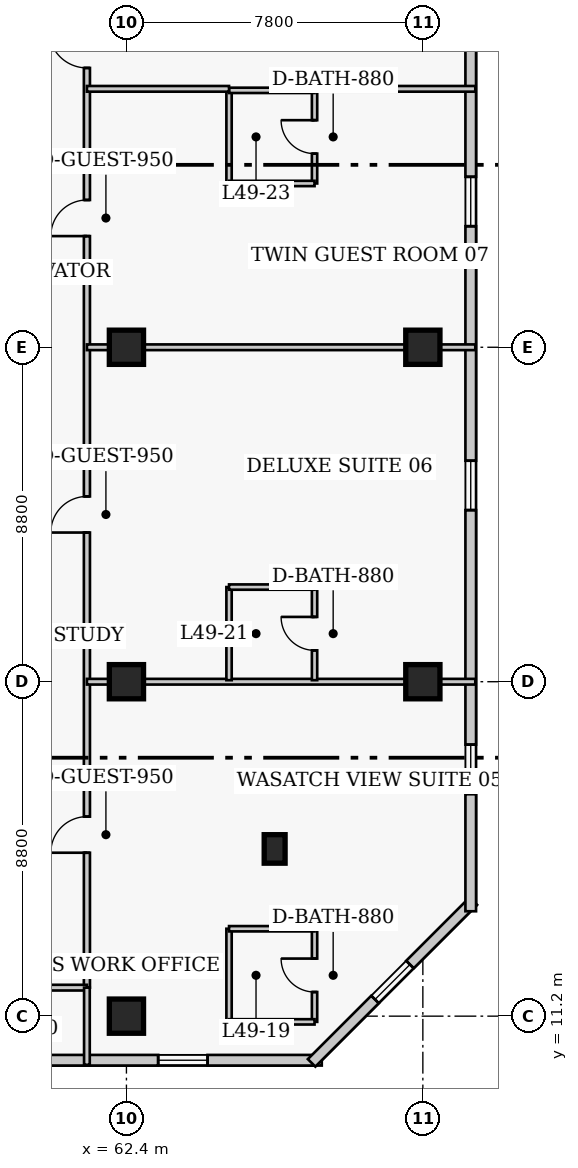
"""IFC4 building model, lengths in metres.
Left out: names, types, materials, properties, quantities, classifications, styles, units other than length and angle.
Written with IfcOpenShell. Run it as: python <this file> out.ifc"""

import sys

from ifc_helpers import new_model, si_unit, direction, frame, frame_2d, origin, origin_2d, place, context, subcontext, project, spatial, rectangle, extrude, element, fill, save


model = new_model("IFC4")
c1 = context("Model", 3, precision=1e-05, world=origin(), true_north=direction((0.0, 1.0)))
c2 = subcontext(c1, "Body", "Model", "MODEL_VIEW")
j1 = project(units=[si_unit("LENGTHUNIT", "METRE"), si_unit("PLANEANGLEUNIT", "RADIAN")], contexts=[c1])
p1 = place(None, origin())
s1 = spatial("IfcSite", under=j1, at=p1, CompositionType="ELEMENT")
p2 = place(p1, origin())
s2 = spatial("IfcBuilding", under=s1, at=p2, CompositionType="ELEMENT")
p3 = place(p2, frame((0.0, 0.0, 196.8)))
s3 = spatial("IfcBuildingStorey", under=s2, at=p3, CompositionType="ELEMENT", Elevation=196.8)
for number, where, z_axis, x_axis in (
    (1, (62.4, 11.2, 0.0), (0.0, 0.0, 1.0), (1.0, 0.0, 0.0)),
    (2, (62.4, 20.0, 0.0), (0.0, 0.0, 1.0), (1.0, 0.0, 0.0)),
    (3, (62.4, 28.8, 0.0), (0.0, 0.0, 1.0), (1.0, 0.0, 0.0)),
    (4, (70.2, 20.0, 0.0), (0.0, 0.0, 1.0), (1.0, 0.0, 0.0)),
    (5, (70.2, 28.8, 0.0), (0.0, 0.0, 1.0), (1.0, 0.0, 0.0)),
):
    element("IfcColumn", number, at=place(p3, frame(where, z_axis=z_axis, x_axis=x_axis)), inside=s3, PredefinedType="COLUMN", context=c2, shape_type="SweptSolid", body=[
        extrude(rectangle(XDim=0.9, YDim=0.9, at=origin_2d()), origin(), (0.0, 0.0, 1.0), 3.9),
    ])
p4 = place(p3, frame((66.3, 15.6, 0.0), z_axis=(0.0, 0.0, 1.0), x_axis=(1.0, 0.0, 0.0)))
e6 = element("IfcColumn", 6, at=p4, inside=s3, PredefinedType="PILASTER", context=c2, shape_type="SweptSolid", body=[
    extrude(rectangle(XDim=0.55, YDim=0.75, at=origin_2d()), origin(), (0.0, 0.0, 1.0), 3.9),
])
p5 = place(p3, frame((41.71, 10.04, 0.0), z_axis=(0.0, 0.0, 1.0), x_axis=(1.0, 0.0, 0.0)))
e7 = element("IfcWall", 7, at=p5, inside=s3, PredefinedType="SOLIDWALL", context=c2, shape_type="SweptSolid", body=[
    extrude(rectangle(XDim=25.83, YDim=0.28, at=frame_2d((12.915, 0.0))), origin(), (0.0, 0.0, 1.0), 3.65),
])
p6 = place(p5, frame((9.04, 0.0, 0.0)))
e8 = element("IfcOpeningElement", 8, at=p6, cuts=e7, PredefinedType="OPENING", context=c2, shape_type="SweptSolid", body=[
    extrude(rectangle(XDim=1.4, YDim=2.15, at=frame_2d((0.7, 1.075))), frame((0.0, 0.15, 0.0), z_axis=(0.0, -1.0, 0.0), x_axis=(1.0, 0.0, 0.0)), (0.0, 0.0, 1.0), 0.3),
])
p7 = place(p5, frame((3.005, 0.0, 0.85)))
e9 = element("IfcOpeningElement", 9, at=p7, cuts=e7, PredefinedType="OPENING", context=c2, shape_type="SweptSolid", body=[
    extrude(rectangle(XDim=1.3, YDim=1.7, at=frame_2d((0.65, 0.85))), frame((0.0, 0.15, 0.0), z_axis=(0.0, -1.0, 0.0), x_axis=(1.0, 0.0, 0.0)), (0.0, 0.0, 1.0), 0.3),
])
p8 = place(p5, frame((13.415, 0.0, 0.85)))
e10 = element("IfcOpeningElement", 10, at=p8, cuts=e7, PredefinedType="OPENING", context=c2, shape_type="SweptSolid", body=[
    extrude(rectangle(XDim=1.3, YDim=1.7, at=frame_2d((0.65, 0.85))), frame((0.0, 0.15, 0.0), z_axis=(0.0, -1.0, 0.0), x_axis=(1.0, 0.0, 0.0)), (0.0, 0.0, 1.0), 0.3),
])
p9 = place(p5, frame((21.525, 0.0, 0.85)))
e11 = element("IfcOpeningElement", 11, at=p9, cuts=e7, PredefinedType="OPENING", context=c2, shape_type="SweptSolid", body=[
    extrude(rectangle(XDim=1.3, YDim=1.7, at=frame_2d((0.65, 0.85))), frame((0.0, 0.15, 0.0), z_axis=(0.0, -1.0, 0.0), x_axis=(1.0, 0.0, 0.0)), (0.0, 0.0, 1.0), 0.3),
])
p10 = place(p3, frame((67.273, 9.971, 0.0), z_axis=(0.0, 0.0, 1.0), x_axis=(0.707106781187, 0.707106781187, 0.0)))
e12 = element("IfcWall", 12, at=p10, inside=s3, PredefinedType="SOLIDWALL", context=c2, shape_type="SweptSolid", body=[
    extrude(rectangle(XDim=6.02, YDim=0.28, at=frame_2d((3.01, 0.0))), origin(), (0.0, 0.0, 1.0), 3.65),
])
p11 = place(p10, frame((2.36, 0.0, 0.85)))
e13 = element("IfcOpeningElement", 13, at=p11, cuts=e12, PredefinedType="OPENING", context=c2, shape_type="SweptSolid", body=[
    extrude(rectangle(XDim=1.3, YDim=1.7, at=frame_2d((0.65, 0.85))), frame((0.0, 0.15, 0.0), z_axis=(0.0, -1.0, 0.0), x_axis=(1.0, 0.0, 0.0)), (0.0, 0.0, 1.0), 0.3),
])
p12 = place(p3, frame((71.46, 13.96, 0.0), z_axis=(0.0, 0.0, 1.0), x_axis=(0.0, 1.0, 0.0)))
e14 = element("IfcWall", 14, at=p12, inside=s3, PredefinedType="SOLIDWALL", context=c2, shape_type="SweptSolid", body=[
    extrude(rectangle(XDim=29.88, YDim=0.28, at=frame_2d((14.94, 0.0))), origin(), (0.0, 0.0, 1.0), 3.65),
])
p13 = place(p12, frame((3.085, 0.0, 0.85)))
e15 = element("IfcOpeningElement", 15, at=p13, cuts=e14, PredefinedType="OPENING", context=c2, shape_type="SweptSolid", body=[
    extrude(rectangle(XDim=1.3, YDim=1.7, at=frame_2d((0.65, 0.85))), frame((0.0, 0.15, 0.0), z_axis=(0.0, -1.0, 0.0), x_axis=(1.0, 0.0, 0.0)), (0.0, 0.0, 1.0), 0.3),
])
p14 = place(p12, frame((10.555, 0.0, 0.85)))
e16 = element("IfcOpeningElement", 16, at=p14, cuts=e14, PredefinedType="OPENING", context=c2, shape_type="SweptSolid", body=[
    extrude(rectangle(XDim=1.3, YDim=1.7, at=frame_2d((0.65, 0.85))), frame((0.0, 0.15, 0.0), z_axis=(0.0, -1.0, 0.0), x_axis=(1.0, 0.0, 0.0)), (0.0, 0.0, 1.0), 0.3),
])
p15 = place(p12, frame((18.025, 0.0, 0.85)))
e17 = element("IfcOpeningElement", 17, at=p15, cuts=e14, PredefinedType="OPENING", context=c2, shape_type="SweptSolid", body=[
    extrude(rectangle(XDim=1.3, YDim=1.7, at=frame_2d((0.65, 0.85))), frame((0.0, 0.15, 0.0), z_axis=(0.0, -1.0, 0.0), x_axis=(1.0, 0.0, 0.0)), (0.0, 0.0, 1.0), 0.3),
])
p16 = place(p12, frame((25.495, 0.0, 0.85)))
e18 = element("IfcOpeningElement", 18, at=p16, cuts=e14, PredefinedType="OPENING", context=c2, shape_type="SweptSolid", body=[
    extrude(rectangle(XDim=1.3, YDim=1.7, at=frame_2d((0.65, 0.85))), frame((0.0, 0.15, 0.0), z_axis=(0.0, -1.0, 0.0), x_axis=(1.0, 0.0, 0.0)), (0.0, 0.0, 1.0), 0.3),
])
p17 = place(p3, frame((61.36, 11.95, 0.0), z_axis=(0.0, 0.0, 1.0), x_axis=(0.0, 1.0, 0.0)))
e19 = element("IfcWall", 19, at=p17, inside=s3, PredefinedType="PARTITIONING", context=c2, shape_type="SweptSolid", body=[
    extrude(rectangle(XDim=28.7, YDim=0.16, at=frame_2d((14.35, 0.0))), origin(), (0.0, 0.0, 1.0), 3.65),
])
p18 = place(p17, frame((3.55, 0.0, 0.0)))
e20 = element("IfcOpeningElement", 20, at=p18, cuts=e19, PredefinedType="OPENING", context=c2, shape_type="SweptSolid", body=[
    extrude(rectangle(XDim=0.95, YDim=2.1, at=frame_2d((0.475, 1.05))), frame((0.0, 0.09, 0.0), z_axis=(0.0, -1.0, 0.0), x_axis=(1.0, 0.0, 0.0)), (0.0, 0.0, 1.0), 0.18),
])
p19 = place(p17, frame((11.975, 0.0, 0.0)))
e21 = element("IfcOpeningElement", 21, at=p19, cuts=e19, PredefinedType="OPENING", context=c2, shape_type="SweptSolid", body=[
    extrude(rectangle(XDim=0.95, YDim=2.1, at=frame_2d((0.475, 1.05))), frame((0.0, 0.09, 0.0), z_axis=(0.0, -1.0, 0.0), x_axis=(1.0, 0.0, 0.0)), (0.0, 0.0, 1.0), 0.18),
])
p20 = place(p17, frame((19.775, 0.0, 0.0)))
e22 = element("IfcOpeningElement", 22, at=p20, cuts=e19, PredefinedType="OPENING", context=c2, shape_type="SweptSolid", body=[
    extrude(rectangle(XDim=0.95, YDim=2.1, at=frame_2d((0.475, 1.05))), frame((0.0, 0.09, 0.0), z_axis=(0.0, -1.0, 0.0), x_axis=(1.0, 0.0, 0.0)), (0.0, 0.0, 1.0), 0.18),
])
p21 = place(p17, frame((24.2, 0.0, 0.0)))
e23 = element("IfcOpeningElement", 23, at=p21, cuts=e19, PredefinedType="OPENING", context=c2, shape_type="SweptSolid", body=[
    extrude(rectangle(XDim=1.0, YDim=2.15, at=frame_2d((0.5, 1.075))), frame((0.0, 0.09, 0.0), z_axis=(0.0, -1.0, 0.0), x_axis=(1.0, 0.0, 0.0)), (0.0, 0.0, 1.0), 0.18),
])
p22 = place(p3, frame((59.14, 11.95, 0.0), z_axis=(0.0, 0.0, 1.0), x_axis=(1.0, 0.0, 0.0)))
e24 = element("IfcWall", 24, at=p22, inside=s3, PredefinedType="PARTITIONING", context=c2, shape_type="SweptSolid", body=[
    extrude(rectangle(XDim=2.22, YDim=0.15, at=frame_2d((1.11, 0.0))), origin(), (0.0, 0.0, 1.0), 3.65),
])
p23 = place(p3, frame((61.36, 9.92, 0.0), z_axis=(0.0, 0.0, 1.0), x_axis=(0.0, 1.0, 0.0)))
e25 = element("IfcWall", 25, at=p23, inside=s3, PredefinedType="PARTITIONING", context=c2, shape_type="SweptSolid", body=[
    extrude(rectangle(XDim=2.03, YDim=0.15, at=frame_2d((1.015, 0.0))), origin(), (0.0, 0.0, 1.0), 3.65),
])
p24 = place(p3, frame((65.1, 11.05, 0.0), z_axis=(0.0, 0.0, 1.0), x_axis=(0.0, 1.0, 0.0)))
e26 = element("IfcWall", 26, at=p24, inside=s3, PredefinedType="PLUMBINGWALL", context=c2, shape_type="SweptSolid", body=[
    extrude(rectangle(XDim=2.45, YDim=0.14, at=frame_2d((1.225, 0.0))), origin(), (0.0, 0.0, 1.0), 3.65),
])
p25 = place(p3, frame((67.35, 11.05, 0.0), z_axis=(0.0, 0.0, 1.0), x_axis=(0.0, 1.0, 0.0)))
e27 = element("IfcWall", 27, at=p25, inside=s3, PredefinedType="PLUMBINGWALL", context=c2, shape_type="SweptSolid", body=[
    extrude(rectangle(XDim=2.45, YDim=0.14, at=frame_2d((1.225, 0.0))), origin(), (0.0, 0.0, 1.0), 3.65),
])
p26 = place(p25, frame((0.785, 0.0, 0.0)))
e28 = element("IfcOpeningElement", 28, at=p26, cuts=e27, PredefinedType="OPENING", context=c2, shape_type="SweptSolid", body=[
    extrude(rectangle(XDim=0.88, YDim=2.05, at=frame_2d((0.44, 1.025))), frame((0.0, 0.08, 0.0), z_axis=(0.0, -1.0, 0.0), x_axis=(1.0, 0.0, 0.0)), (0.0, 0.0, 1.0), 0.16),
])
for number, where, z_axis, x_axis in (
    (29, (65.1, 11.05, 0.0), (0.0, 0.0, 1.0), (1.0, 0.0, 0.0)),
    (30, (65.1, 13.5, 0.0), (0.0, 0.0, 1.0), (1.0, 0.0, 0.0)),
):
    element("IfcWall", number, at=place(p3, frame(where, z_axis=z_axis, x_axis=x_axis)), inside=s3, PredefinedType="PLUMBINGWALL", context=c2, shape_type="SweptSolid", body=[
        extrude(rectangle(XDim=2.25, YDim=0.14, at=frame_2d((1.125, 0.0))), origin(), (0.0, 0.0, 1.0), 3.65),
    ])
p27 = place(p3, frame((61.36, 20.0, 0.0), z_axis=(0.0, 0.0, 1.0), x_axis=(1.0, 0.0, 0.0)))
e31 = element("IfcWall", 31, at=p27, inside=s3, PredefinedType="PARTITIONING", context=c2, shape_type="SweptSolid", body=[
    extrude(rectangle(XDim=10.22, YDim=0.15, at=frame_2d((5.11, 0.0))), origin(), (0.0, 0.0, 1.0), 2.878),
])
p28 = place(p3, frame((65.1, 20.04, 0.0), z_axis=(0.0, 0.0, 1.0), x_axis=(0.0, 1.0, 0.0)))
e32 = element("IfcWall", 32, at=p28, inside=s3, PredefinedType="PLUMBINGWALL", context=c2, shape_type="SweptSolid", body=[
    extrude(rectangle(XDim=2.45, YDim=0.14, at=frame_2d((1.225, 0.0))), origin(), (0.0, 0.0, 1.0), 3.65),
])
p29 = place(p3, frame((67.35, 20.04, 0.0), z_axis=(0.0, 0.0, 1.0), x_axis=(0.0, 1.0, 0.0)))
e33 = element("IfcWall", 33, at=p29, inside=s3, PredefinedType="PLUMBINGWALL", context=c2, shape_type="SweptSolid", body=[
    extrude(rectangle(XDim=2.45, YDim=0.14, at=frame_2d((1.225, 0.0))), origin(), (0.0, 0.0, 1.0), 3.65),
])
p30 = place(p29, frame((0.785, 0.0, 0.0)))
e34 = element("IfcOpeningElement", 34, at=p30, cuts=e33, PredefinedType="OPENING", context=c2, shape_type="SweptSolid", body=[
    extrude(rectangle(XDim=0.88, YDim=2.05, at=frame_2d((0.44, 1.025))), frame((0.0, 0.08, 0.0), z_axis=(0.0, -1.0, 0.0), x_axis=(1.0, 0.0, 0.0)), (0.0, 0.0, 1.0), 0.16),
])
p31 = place(p3, frame((65.1, 22.49, 0.0), z_axis=(0.0, 0.0, 1.0), x_axis=(1.0, 0.0, 0.0)))
e35 = element("IfcWall", 35, at=p31, inside=s3, PredefinedType="PLUMBINGWALL", context=c2, shape_type="SweptSolid", body=[
    extrude(rectangle(XDim=2.25, YDim=0.14, at=frame_2d((1.125, 0.0))), origin(), (0.0, 0.0, 1.0), 3.65),
])
p32 = place(p3, frame((61.36, 28.8, 0.0), z_axis=(0.0, 0.0, 1.0), x_axis=(1.0, 0.0, 0.0)))
e36 = element("IfcWall", 36, at=p32, inside=s3, PredefinedType="PARTITIONING", context=c2, shape_type="SweptSolid", body=[
    extrude(rectangle(XDim=10.22, YDim=0.15, at=frame_2d((5.11, 0.0))), origin(), (0.0, 0.0, 1.0), 2.878),
])
p33 = place(p3, frame((65.1, 33.11, 0.0), z_axis=(0.0, 0.0, 1.0), x_axis=(0.0, 1.0, 0.0)))
e37 = element("IfcWall", 37, at=p33, inside=s3, PredefinedType="PLUMBINGWALL", context=c2, shape_type="SweptSolid", body=[
    extrude(rectangle(XDim=2.45, YDim=0.14, at=frame_2d((1.225, 0.0))), origin(), (0.0, 0.0, 1.0), 3.65),
])
p34 = place(p3, frame((67.35, 33.11, 0.0), z_axis=(0.0, 0.0, 1.0), x_axis=(0.0, 1.0, 0.0)))
e38 = element("IfcWall", 38, at=p34, inside=s3, PredefinedType="PLUMBINGWALL", context=c2, shape_type="SweptSolid", body=[
    extrude(rectangle(XDim=2.45, YDim=0.14, at=frame_2d((1.225, 0.0))), origin(), (0.0, 0.0, 1.0), 3.65),
])
p35 = place(p34, frame((0.785, 0.0, 0.0)))
e39 = element("IfcOpeningElement", 39, at=p35, cuts=e38, PredefinedType="OPENING", context=c2, shape_type="SweptSolid", body=[
    extrude(rectangle(XDim=0.88, YDim=2.05, at=frame_2d((0.44, 1.025))), frame((0.0, 0.08, 0.0), z_axis=(0.0, -1.0, 0.0), x_axis=(1.0, 0.0, 0.0)), (0.0, 0.0, 1.0), 0.16),
])
for number, where, z_axis, x_axis in (
    (40, (65.1, 33.11, 0.0), (0.0, 0.0, 1.0), (1.0, 0.0, 0.0)),
    (41, (65.1, 35.56, 0.0), (0.0, 0.0, 1.0), (1.0, 0.0, 0.0)),
):
    element("IfcWall", number, at=place(p3, frame(where, z_axis=z_axis, x_axis=x_axis)), inside=s3, PredefinedType="PLUMBINGWALL", context=c2, shape_type="SweptSolid", body=[
        extrude(rectangle(XDim=2.25, YDim=0.14, at=frame_2d((1.125, 0.0))), origin(), (0.0, 0.0, 1.0), 3.65),
    ])
p36 = place(p3, frame((61.36, 35.6, 0.0), z_axis=(0.0, 0.0, 1.0), x_axis=(1.0, 0.0, 0.0)))
e42 = element("IfcWall", 42, at=p36, inside=s3, PredefinedType="PARTITIONING", context=c2, shape_type="SweptSolid", body=[
    extrude(rectangle(XDim=3.74, YDim=0.15, at=frame_2d((1.87, 0.0))), origin(), (0.0, 0.0, 1.0), 3.65),
])
p37 = place(p3, frame((67.35, 35.6, 0.0), z_axis=(0.0, 0.0, 1.0), x_axis=(1.0, 0.0, 0.0)))
e43 = element("IfcWall", 43, at=p37, inside=s3, PredefinedType="PARTITIONING", context=c2, shape_type="SweptSolid", body=[
    extrude(rectangle(XDim=4.23, YDim=0.15, at=frame_2d((2.115, 0.0))), origin(), (0.0, 0.0, 1.0), 3.65),
])
p38 = place(p9, origin())
e44 = element("IfcWindow", 44, at=p38, inside=s3, PartitioningType="SINGLE_PANEL", PredefinedType="WINDOW", context=c2, shape_type="SweptSolid", body=[
    extrude(rectangle(XDim=1.3, YDim=1.7, at=frame_2d((0.65, 0.85))), frame((0.0, 0.03, 0.0), z_axis=(0.0, -1.0, 0.0), x_axis=(1.0, 0.0, 0.0)), (0.0, 0.0, 1.0), 0.06),
])
fill(e11, e44)
p39 = place(p11, origin())
e45 = element("IfcWindow", 45, at=p39, inside=s3, PartitioningType="SINGLE_PANEL", PredefinedType="WINDOW", context=c2, shape_type="SweptSolid", body=[
    extrude(rectangle(XDim=1.3, YDim=1.7, at=frame_2d((0.65, 0.85))), frame((0.0, 0.03, 0.0), z_axis=(0.0, -1.0, 0.0), x_axis=(1.0, 0.0, 0.0)), (0.0, 0.0, 1.0), 0.06),
])
fill(e13, e45)
p40 = place(p13, origin())
e46 = element("IfcWindow", 46, at=p40, inside=s3, PartitioningType="SINGLE_PANEL", PredefinedType="WINDOW", context=c2, shape_type="SweptSolid", body=[
    extrude(rectangle(XDim=1.3, YDim=1.7, at=frame_2d((0.65, 0.85))), frame((0.0, 0.03, 0.0), z_axis=(0.0, -1.0, 0.0), x_axis=(1.0, 0.0, 0.0)), (0.0, 0.0, 1.0), 0.06),
])
fill(e15, e46)
p41 = place(p14, origin())
e47 = element("IfcWindow", 47, at=p41, inside=s3, PartitioningType="SINGLE_PANEL", PredefinedType="WINDOW", context=c2, shape_type="SweptSolid", body=[
    extrude(rectangle(XDim=1.3, YDim=1.7, at=frame_2d((0.65, 0.85))), frame((0.0, 0.03, 0.0), z_axis=(0.0, -1.0, 0.0), x_axis=(1.0, 0.0, 0.0)), (0.0, 0.0, 1.0), 0.06),
])
fill(e16, e47)
p42 = place(p15, origin())
e48 = element("IfcWindow", 48, at=p42, inside=s3, PartitioningType="SINGLE_PANEL", PredefinedType="WINDOW", context=c2, shape_type="SweptSolid", body=[
    extrude(rectangle(XDim=1.3, YDim=1.7, at=frame_2d((0.65, 0.85))), frame((0.0, 0.03, 0.0), z_axis=(0.0, -1.0, 0.0), x_axis=(1.0, 0.0, 0.0)), (0.0, 0.0, 1.0), 0.06),
])
fill(e17, e48)
p43 = place(p26, origin())
e49 = element("IfcDoor", 49, at=p43, inside=s3, OperationType="SINGLE_SWING_RIGHT", PredefinedType="DOOR", context=c2, shape_type="SweptSolid", body=[
    extrude(rectangle(XDim=0.88, YDim=2.05, at=frame_2d((0.44, 1.025))), frame((0.0, 0.025, 0.0), z_axis=(0.0, -1.0, 0.0), x_axis=(1.0, 0.0, 0.0)), (0.0, 0.0, 1.0), 0.05),
])
fill(e28, e49)
p44 = place(p18, origin())
e50 = element("IfcDoor", 50, at=p44, inside=s3, OperationType="SINGLE_SWING_LEFT", PredefinedType="DOOR", context=c2, shape_type="SweptSolid", body=[
    extrude(rectangle(XDim=0.95, YDim=2.1, at=frame_2d((0.475, 1.05))), frame((0.0, 0.025, 0.0), z_axis=(0.0, -1.0, 0.0), x_axis=(1.0, 0.0, 0.0)), (0.0, 0.0, 1.0), 0.05),
])
fill(e20, e50)
p45 = place(p30, origin())
e51 = element("IfcDoor", 51, at=p45, inside=s3, OperationType="SINGLE_SWING_RIGHT", PredefinedType="DOOR", context=c2, shape_type="SweptSolid", body=[
    extrude(rectangle(XDim=0.88, YDim=2.05, at=frame_2d((0.44, 1.025))), frame((0.0, 0.025, 0.0), z_axis=(0.0, -1.0, 0.0), x_axis=(1.0, 0.0, 0.0)), (0.0, 0.0, 1.0), 0.05),
])
fill(e34, e51)
p46 = place(p19, origin())
e52 = element("IfcDoor", 52, at=p46, inside=s3, OperationType="SINGLE_SWING_LEFT", PredefinedType="DOOR", context=c2, shape_type="SweptSolid", body=[
    extrude(rectangle(XDim=0.95, YDim=2.1, at=frame_2d((0.475, 1.05))), frame((0.0, 0.025, 0.0), z_axis=(0.0, -1.0, 0.0), x_axis=(1.0, 0.0, 0.0)), (0.0, 0.0, 1.0), 0.05),
])
fill(e21, e52)
p47 = place(p35, origin())
e53 = element("IfcDoor", 53, at=p47, inside=s3, OperationType="SINGLE_SWING_RIGHT", PredefinedType="DOOR", context=c2, shape_type="SweptSolid", body=[
    extrude(rectangle(XDim=0.88, YDim=2.05, at=frame_2d((0.44, 1.025))), frame((0.0, 0.025, 0.0), z_axis=(0.0, -1.0, 0.0), x_axis=(1.0, 0.0, 0.0)), (0.0, 0.0, 1.0), 0.05),
])
fill(e39, e53)
p48 = place(p20, origin())
e54 = element("IfcDoor", 54, at=p48, inside=s3, OperationType="SINGLE_SWING_LEFT", PredefinedType="DOOR", context=c2, shape_type="SweptSolid", body=[
    extrude(rectangle(XDim=0.95, YDim=2.1, at=frame_2d((0.475, 1.05))), frame((0.0, 0.025, 0.0), z_axis=(0.0, -1.0, 0.0), x_axis=(1.0, 0.0, 0.0)), (0.0, 0.0, 1.0), 0.05),
])
fill(e22, e54)
p49 = place(p21, origin())
e55 = element("IfcDoor", 55, at=p49, inside=s3, OperationType="SINGLE_SWING_RIGHT", PredefinedType="DOOR", context=c2, shape_type="SweptSolid", body=[
    extrude(rectangle(XDim=1.0, YDim=2.15, at=frame_2d((0.5, 1.075))), frame((0.0, 0.025, 0.0), z_axis=(0.0, -1.0, 0.0), x_axis=(1.0, 0.0, 0.0)), (0.0, 0.0, 1.0), 0.05),
])
fill(e23, e55)
save(model, sys.argv[1])
